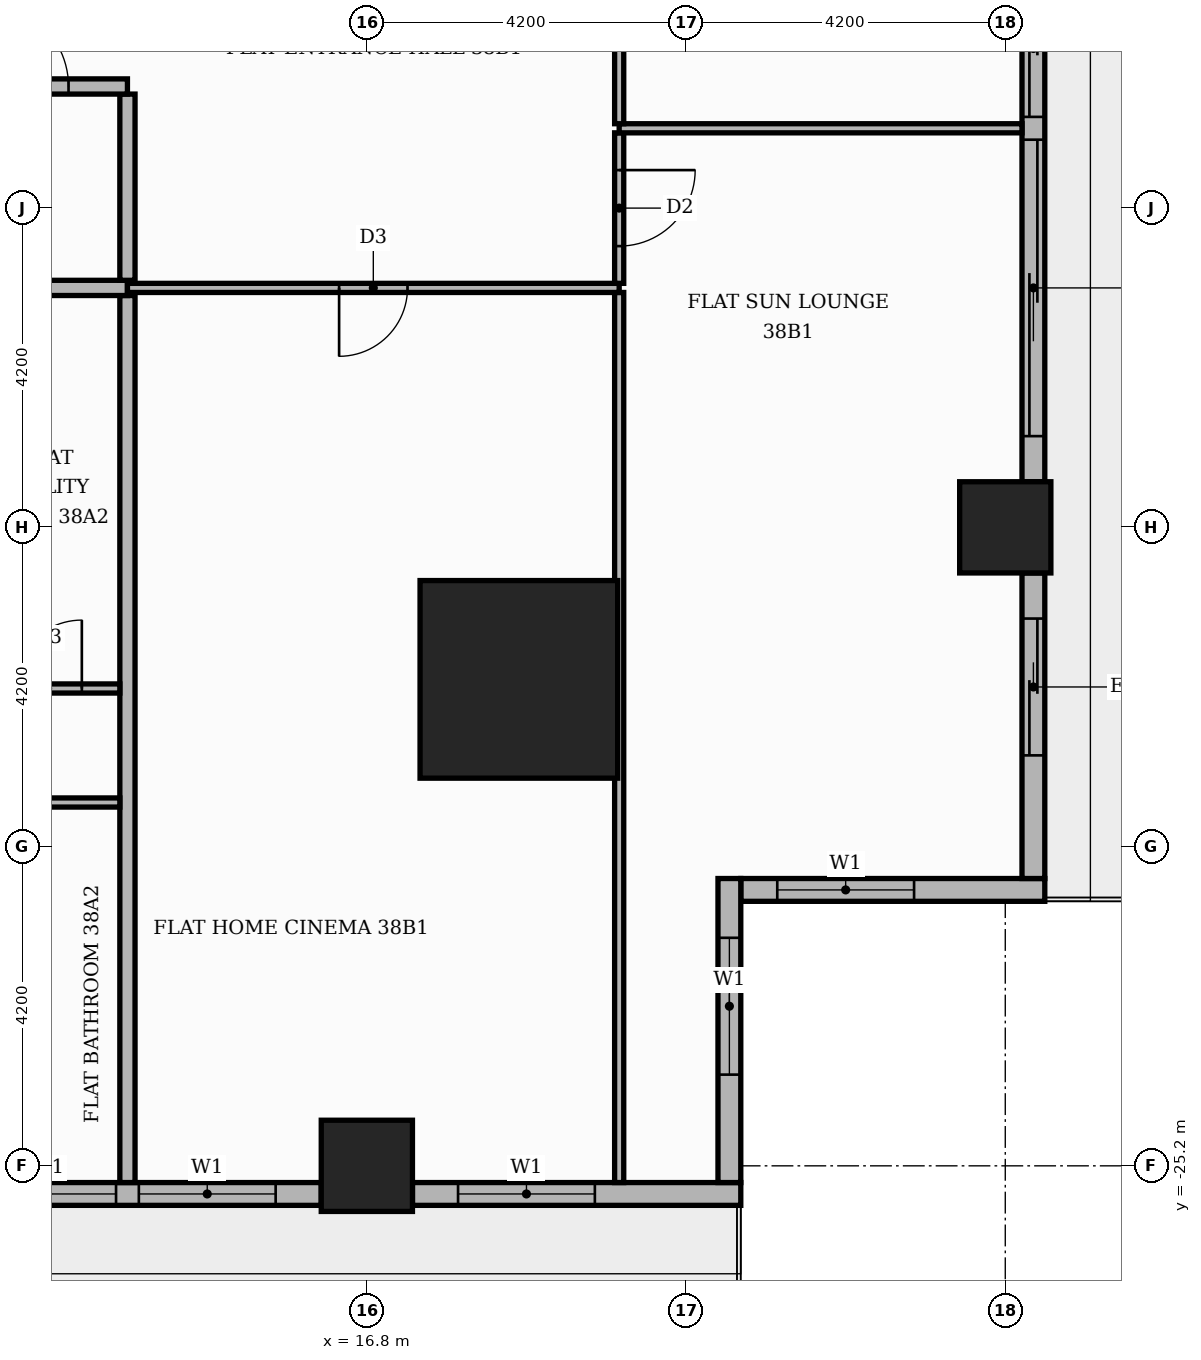
"""IFC4 building model, lengths in metres.
Left out: names, types, materials, properties, quantities, classifications, styles, units other than length and angle.
Written with IfcOpenShell. Run it as: python <this file> out.ifc"""

import sys

from ifc_helpers import new_model, si_unit, direction, frame, frame_2d, origin, origin_2d, place, context, subcontext, project, spatial, rectangle, extrude, element, fill, save


model = new_model("IFC4")
c1 = context("Model", 3, precision=1e-05, world=origin(), true_north=direction((0.0, 1.0)))
c2 = subcontext(c1, "Body", "Model", "MODEL_VIEW")
j1 = project(units=[si_unit("LENGTHUNIT", "METRE"), si_unit("PLANEANGLEUNIT", "RADIAN")], contexts=[c1])
p1 = place(None, origin())
s1 = spatial("IfcSite", under=j1, at=p1, CompositionType="ELEMENT")
p2 = place(p1, origin())
s2 = spatial("IfcBuilding", under=s1, at=p2, CompositionType="ELEMENT")
p3 = place(p2, frame((0.0, 0.0, 161.1)))
s3 = spatial("IfcBuildingStorey", under=s2, at=p3, CompositionType="ELEMENT", Elevation=161.1)
p4 = place(p3, frame((18.8, -18.8, 0.0), z_axis=(0.0, 0.0, 1.0), x_axis=(1.0, 0.0, 0.0)))
e1 = element("IfcColumn", 1, at=p4, inside=s3, PredefinedType="COLUMN", context=c2, shape_type="SweptSolid", body=[
    extrude(rectangle(XDim=2.6, YDim=2.6, at=origin_2d()), origin(), (0.0, 0.0, 1.0), 3.9),
])
for number, where, z_axis, x_axis in (
    (2, (25.2, -16.8, 0.0), (0.0, 0.0, 1.0), (1.0, 0.0, 0.0)),
    (3, (16.8, -25.2, 0.0), (0.0, 0.0, 1.0), (1.0, 0.0, 0.0)),
):
    element("IfcColumn", number, at=place(p3, frame(where, z_axis=z_axis, x_axis=x_axis)), inside=s3, PredefinedType="COLUMN", context=c2, shape_type="SweptSolid", body=[
        extrude(rectangle(XDim=1.2, YDim=1.2, at=origin_2d()), origin(), (0.0, 0.0, 1.0), 3.9),
    ])
p5 = place(p3, frame((21.72, -21.57, 0.0), z_axis=(0.0, 0.0, 1.0), x_axis=(1.0, 0.0, 0.0)))
e4 = element("IfcWall", 4, at=p5, inside=s3, PredefinedType="STANDARD", context=c2, shape_type="SweptSolid", body=[
    extrude(rectangle(XDim=4.0, YDim=0.3, at=frame_2d((2.0, 0.0))), origin(), (0.0, 0.0, 1.0), 3.48),
])
p6 = place(p5, frame((0.48, 0.0, 0.9)))
e5 = element("IfcOpeningElement", 5, at=p6, cuts=e4, PredefinedType="OPENING", context=c2, shape_type="SweptSolid", body=[
    extrude(rectangle(XDim=1.8, YDim=2.1, at=frame_2d((0.9, 1.05))), frame((0.0, 0.16, 0.0), z_axis=(0.0, -1.0, 0.0), x_axis=(1.0, 0.0, 0.0)), (0.0, 0.0, 1.0), 0.32),
])
p7 = place(p3, frame((25.57, -21.42, 0.0), z_axis=(0.0, 0.0, 1.0), x_axis=(0.0, 1.0, 0.0)))
e6 = element("IfcWall", 6, at=p7, inside=s3, PredefinedType="STANDARD", context=c2, shape_type="SweptSolid", body=[
    extrude(rectangle(XDim=4.02, YDim=0.3, at=frame_2d((2.01, 0.0))), origin(), (0.0, 0.0, 1.0), 3.48),
])
p8 = place(p7, frame((1.62, 0.0, 0.0)))
e7 = element("IfcOpeningElement", 7, at=p8, cuts=e6, PredefinedType="OPENING", context=c2, shape_type="SweptSolid", body=[
    extrude(rectangle(XDim=1.8, YDim=2.4, at=frame_2d((0.9, 1.2))), frame((0.0, 0.16, 0.0), z_axis=(0.0, -1.0, 0.0), x_axis=(1.0, 0.0, 0.0)), (0.0, 0.0, 1.0), 0.32),
])
p9 = place(p3, frame((25.57, -16.2, 0.0), z_axis=(0.0, 0.0, 1.0), x_axis=(0.0, 1.0, 0.0)))
e8 = element("IfcWall", 8, at=p9, inside=s3, PredefinedType="STANDARD", context=c2, shape_type="SweptSolid", body=[
    extrude(rectangle(XDim=7.2, YDim=0.3, at=frame_2d((3.6, 0.0))), origin(), (0.0, 0.0, 1.0), 3.48),
])
p10 = place(p9, frame((0.6, 0.0, 0.0)))
e9 = element("IfcOpeningElement", 9, at=p10, cuts=e8, PredefinedType="OPENING", context=c2, shape_type="SweptSolid", body=[
    extrude(rectangle(XDim=3.9, YDim=2.4, at=frame_2d((1.95, 1.2))), frame((0.0, 0.16, 0.0), z_axis=(0.0, -1.0, 0.0), x_axis=(1.0, 0.0, 0.0)), (0.0, 0.0, 1.0), 0.32),
])
p11 = place(p9, frame((4.8, 0.0, 0.0)))
e10 = element("IfcOpeningElement", 10, at=p11, cuts=e8, PredefinedType="OPENING", context=c2, shape_type="SweptSolid", body=[
    extrude(rectangle(XDim=1.8, YDim=2.4, at=frame_2d((0.9, 1.2))), frame((0.0, 0.16, 0.0), z_axis=(0.0, -1.0, 0.0), x_axis=(1.0, 0.0, 0.0)), (0.0, 0.0, 1.0), 0.32),
])
p12 = place(p3, frame((9.0, -25.57, 0.0), z_axis=(0.0, 0.0, 1.0), x_axis=(1.0, 0.0, 0.0)))
e11 = element("IfcWall", 11, at=p12, inside=s3, PredefinedType="STANDARD", context=c2, shape_type="SweptSolid", body=[
    extrude(rectangle(XDim=7.2, YDim=0.3, at=frame_2d((3.6, 0.0))), origin(), (0.0, 0.0, 1.0), 3.48),
])
p13 = place(p12, frame((0.6, 0.0, 0.9)))
e12 = element("IfcOpeningElement", 12, at=p13, cuts=e11, PredefinedType="OPENING", context=c2, shape_type="SweptSolid", body=[
    extrude(rectangle(XDim=1.8, YDim=2.1, at=frame_2d((0.9, 1.05))), frame((0.0, 0.16, 0.0), z_axis=(0.0, -1.0, 0.0), x_axis=(1.0, 0.0, 0.0)), (0.0, 0.0, 1.0), 0.32),
])
p14 = place(p12, frame((2.7, 0.0, 0.9)))
e13 = element("IfcOpeningElement", 13, at=p14, cuts=e11, PredefinedType="OPENING", context=c2, shape_type="SweptSolid", body=[
    extrude(rectangle(XDim=1.8, YDim=2.1, at=frame_2d((0.9, 1.05))), frame((0.0, 0.16, 0.0), z_axis=(0.0, -1.0, 0.0), x_axis=(1.0, 0.0, 0.0)), (0.0, 0.0, 1.0), 0.32),
])
p15 = place(p12, frame((4.8, 0.0, 0.9)))
e14 = element("IfcOpeningElement", 14, at=p15, cuts=e11, PredefinedType="OPENING", context=c2, shape_type="SweptSolid", body=[
    extrude(rectangle(XDim=1.8, YDim=2.1, at=frame_2d((0.9, 1.05))), frame((0.0, 0.16, 0.0), z_axis=(0.0, -1.0, 0.0), x_axis=(1.0, 0.0, 0.0)), (0.0, 0.0, 1.0), 0.32),
])
p16 = place(p3, frame((17.4, -25.57, 0.0), z_axis=(0.0, 0.0, 1.0), x_axis=(1.0, 0.0, 0.0)))
e15 = element("IfcWall", 15, at=p16, inside=s3, PredefinedType="STANDARD", context=c2, shape_type="SweptSolid", body=[
    extrude(rectangle(XDim=4.32, YDim=0.3, at=frame_2d((2.16, 0.0))), origin(), (0.0, 0.0, 1.0), 3.48),
])
p17 = place(p16, frame((0.6, 0.0, 0.9)))
e16 = element("IfcOpeningElement", 16, at=p17, cuts=e15, PredefinedType="OPENING", context=c2, shape_type="SweptSolid", body=[
    extrude(rectangle(XDim=1.8, YDim=2.1, at=frame_2d((0.9, 1.05))), frame((0.0, 0.16, 0.0), z_axis=(0.0, -1.0, 0.0), x_axis=(1.0, 0.0, 0.0)), (0.0, 0.0, 1.0), 0.32),
])
p18 = place(p3, frame((21.57, -25.42, 0.0), z_axis=(0.0, 0.0, 1.0), x_axis=(0.0, 1.0, 0.0)))
e17 = element("IfcWall", 17, at=p18, inside=s3, PredefinedType="STANDARD", context=c2, shape_type="SweptSolid", body=[
    extrude(rectangle(XDim=4.0, YDim=0.3, at=frame_2d((2.0, 0.0))), origin(), (0.0, 0.0, 1.0), 3.48),
])
p19 = place(p18, frame((1.42, 0.0, 0.9)))
e18 = element("IfcOpeningElement", 18, at=p19, cuts=e17, PredefinedType="OPENING", context=c2, shape_type="SweptSolid", body=[
    extrude(rectangle(XDim=1.8, YDim=2.1, at=frame_2d((0.9, 1.05))), frame((0.0, 0.16, 0.0), z_axis=(0.0, -1.0, 0.0), x_axis=(1.0, 0.0, 0.0)), (0.0, 0.0, 1.0), 0.32),
])
p20 = place(p3, frame((13.65, -25.42, 0.0), z_axis=(0.0, 0.0, 1.0), x_axis=(0.0, 1.0, 0.0)))
e19 = element("IfcWall", 19, at=p20, inside=s3, PredefinedType="PARTITIONING", context=c2, shape_type="SweptSolid", body=[
    extrude(rectangle(XDim=11.67, YDim=0.2, at=frame_2d((5.835, 0.0))), origin(), (0.0, 0.0, 1.0), 3.48),
])
p21 = place(p3, frame((20.12, -25.42, 0.0), z_axis=(0.0, 0.0, 1.0), x_axis=(0.0, 1.0, 0.0)))
e20 = element("IfcWall", 20, at=p21, inside=s3, PredefinedType="PARTITIONING", context=c2, shape_type="SweptSolid", body=[
    extrude(rectangle(XDim=11.71, YDim=0.12, at=frame_2d((5.855, 0.0))), origin(), (0.0, 0.0, 1.0), 3.48),
])
p22 = place(p3, frame((-5.15, -20.42, 0.0), z_axis=(0.0, 0.0, 1.0), x_axis=(1.0, 0.0, 0.0)))
e21 = element("IfcWall", 21, at=p22, inside=s3, PredefinedType="PARTITIONING", context=c2, shape_type="SweptSolid", body=[
    extrude(rectangle(XDim=18.7, YDim=0.12, at=frame_2d((9.35, 0.0))), origin(), (0.0, 0.0, 1.0), 3.48),
])
p23 = place(p22, frame((1.5, 0.0, 0.0)))
e22 = element("IfcOpeningElement", 22, at=p23, cuts=e21, PredefinedType="OPENING", context=c2, shape_type="SweptSolid", body=[
    extrude(rectangle(XDim=1.0, YDim=2.1, at=frame_2d((0.5, 1.05))), frame((0.0, 0.07, 0.0), z_axis=(0.0, -1.0, 0.0), x_axis=(1.0, 0.0, 0.0)), (0.0, 0.0, 1.0), 0.14),
])
p24 = place(p22, frame((5.75, 0.0, 0.0)))
e23 = element("IfcOpeningElement", 23, at=p24, cuts=e21, PredefinedType="OPENING", context=c2, shape_type="SweptSolid", body=[
    extrude(rectangle(XDim=0.9, YDim=2.1, at=frame_2d((0.45, 1.05))), frame((0.0, 0.07, 0.0), z_axis=(0.0, -1.0, 0.0), x_axis=(1.0, 0.0, 0.0)), (0.0, 0.0, 1.0), 0.14),
])
p25 = place(p22, frame((14.15, 0.0, 0.0)))
e24 = element("IfcOpeningElement", 24, at=p25, cuts=e21, PredefinedType="OPENING", context=c2, shape_type="SweptSolid", body=[
    extrude(rectangle(XDim=0.9, YDim=2.1, at=frame_2d((0.45, 1.05))), frame((0.0, 0.07, 0.0), z_axis=(0.0, -1.0, 0.0), x_axis=(1.0, 0.0, 0.0)), (0.0, 0.0, 1.0), 0.14),
])
p26 = place(p3, frame((-1.05, -18.92, 0.0), z_axis=(0.0, 0.0, 1.0), x_axis=(1.0, 0.0, 0.0)))
e25 = element("IfcWall", 25, at=p26, inside=s3, PredefinedType="PARTITIONING", context=c2, shape_type="SweptSolid", body=[
    extrude(rectangle(XDim=14.6, YDim=0.12, at=frame_2d((7.3, 0.0))), origin(), (0.0, 0.0, 1.0), 3.48),
])
p27 = place(p26, frame((2.7, 0.0, 0.0)))
e26 = element("IfcOpeningElement", 26, at=p27, cuts=e25, PredefinedType="OPENING", context=c2, shape_type="SweptSolid", body=[
    extrude(rectangle(XDim=0.9, YDim=2.1, at=frame_2d((0.45, 1.05))), frame((0.0, 0.07, 0.0), z_axis=(0.0, -1.0, 0.0), x_axis=(1.0, 0.0, 0.0)), (0.0, 0.0, 1.0), 0.14),
])
p28 = place(p26, frame((7.05, 0.0, 0.0)))
e27 = element("IfcOpeningElement", 27, at=p28, cuts=e25, PredefinedType="OPENING", context=c2, shape_type="SweptSolid", body=[
    extrude(rectangle(XDim=0.9, YDim=2.1, at=frame_2d((0.45, 1.05))), frame((0.0, 0.07, 0.0), z_axis=(0.0, -1.0, 0.0), x_axis=(1.0, 0.0, 0.0)), (0.0, 0.0, 1.0), 0.14),
])
p29 = place(p26, frame((10.2, 0.0, 0.0)))
e28 = element("IfcOpeningElement", 28, at=p29, cuts=e25, PredefinedType="OPENING", context=c2, shape_type="SweptSolid", body=[
    extrude(rectangle(XDim=0.9, YDim=2.1, at=frame_2d((0.45, 1.05))), frame((0.0, 0.07, 0.0), z_axis=(0.0, -1.0, 0.0), x_axis=(1.0, 0.0, 0.0)), (0.0, 0.0, 1.0), 0.14),
])
p30 = place(p26, frame((13.2, 0.0, 0.0)))
e29 = element("IfcOpeningElement", 29, at=p30, cuts=e25, PredefinedType="OPENING", context=c2, shape_type="SweptSolid", body=[
    extrude(rectangle(XDim=0.9, YDim=2.1, at=frame_2d((0.45, 1.05))), frame((0.0, 0.07, 0.0), z_axis=(0.0, -1.0, 0.0), x_axis=(1.0, 0.0, 0.0)), (0.0, 0.0, 1.0), 0.14),
])
p31 = place(p3, frame((-25.42, -13.65, 0.0), z_axis=(0.0, 0.0, 1.0), x_axis=(1.0, 0.0, 0.0)))
e30 = element("IfcWall", 30, at=p31, inside=s3, PredefinedType="PARTITIONING", context=c2, shape_type="SweptSolid", body=[
    extrude(rectangle(XDim=39.07, YDim=0.2, at=frame_2d((19.535, 0.0))), origin(), (0.0, 0.0, 1.0), 3.48),
])
p32 = place(p31, frame((13.32, 0.0, 0.0)))
e31 = element("IfcOpeningElement", 31, at=p32, cuts=e30, PredefinedType="OPENING", context=c2, shape_type="SweptSolid", body=[
    extrude(rectangle(XDim=1.1, YDim=2.4, at=frame_2d((0.55, 1.2))), frame((0.0, 0.11, 0.0), z_axis=(0.0, -1.0, 0.0), x_axis=(1.0, 0.0, 0.0)), (0.0, 0.0, 1.0), 0.22),
])
p33 = place(p31, frame((21.72, 0.0, 0.0)))
e32 = element("IfcOpeningElement", 32, at=p33, cuts=e30, PredefinedType="OPENING", context=c2, shape_type="SweptSolid", body=[
    extrude(rectangle(XDim=1.1, YDim=2.4, at=frame_2d((0.55, 1.2))), frame((0.0, 0.11, 0.0), z_axis=(0.0, -1.0, 0.0), x_axis=(1.0, 0.0, 0.0)), (0.0, 0.0, 1.0), 0.22),
])
p34 = place(p3, frame((13.65, -13.65, 0.0), z_axis=(0.0, 0.0, 1.0), x_axis=(1.0, 0.0, 0.0)))
e33 = element("IfcWall", 33, at=p34, inside=s3, PredefinedType="PARTITIONING", context=c2, shape_type="SweptSolid", body=[
    extrude(rectangle(XDim=6.47, YDim=0.12, at=frame_2d((3.235, 0.0))), origin(), (0.0, 0.0, 1.0), 3.48),
])
p35 = place(p34, frame((2.785, 0.0, 0.0)))
e34 = element("IfcOpeningElement", 34, at=p35, cuts=e33, PredefinedType="OPENING", context=c2, shape_type="SweptSolid", body=[
    extrude(rectangle(XDim=0.9, YDim=2.1, at=frame_2d((0.45, 1.05))), frame((0.0, 0.07, 0.0), z_axis=(0.0, -1.0, 0.0), x_axis=(1.0, 0.0, 0.0)), (0.0, 0.0, 1.0), 0.14),
])
p36 = place(p3, frame((20.12, -13.59, 0.0), z_axis=(0.0, 0.0, 1.0), x_axis=(0.0, 1.0, 0.0)))
e35 = element("IfcWall", 35, at=p36, inside=s3, PredefinedType="PARTITIONING", context=c2, shape_type="SweptSolid", body=[
    extrude(rectangle(XDim=1.98, YDim=0.12, at=frame_2d((0.99, 0.0))), origin(), (0.0, 0.0, 1.0), 3.48),
])
p37 = place(p36, frame((0.49, 0.0, 0.0)))
e36 = element("IfcOpeningElement", 36, at=p37, cuts=e35, PredefinedType="OPENING", context=c2, shape_type="SweptSolid", body=[
    extrude(rectangle(XDim=1.0, YDim=2.1, at=frame_2d((0.5, 1.05))), frame((0.0, 0.07, 0.0), z_axis=(0.0, -1.0, 0.0), x_axis=(1.0, 0.0, 0.0)), (0.0, 0.0, 1.0), 0.14),
])
p38 = place(p3, frame((13.65, -13.55, 0.0), z_axis=(0.0, 0.0, 1.0), x_axis=(0.0, 1.0, 0.0)))
e37 = element("IfcWall", 37, at=p38, inside=s3, PredefinedType="PARTITIONING", context=c2, shape_type="SweptSolid", body=[
    extrude(rectangle(XDim=2.45, YDim=0.2, at=frame_2d((1.225, 0.0))), origin(), (0.0, 0.0, 1.0), 3.48),
])
p39 = place(p3, frame((20.12, -11.55, 0.0), z_axis=(0.0, 0.0, 1.0), x_axis=(1.0, 0.0, 0.0)))
e38 = element("IfcWall", 38, at=p39, inside=s3, PredefinedType="PARTITIONING", context=c2, shape_type="SweptSolid", body=[
    extrude(rectangle(XDim=5.3, YDim=0.12, at=frame_2d((2.65, 0.0))), origin(), (0.0, 0.0, 1.0), 3.48),
])
p40 = place(p3, frame((20.12, -11.49, 0.0), z_axis=(0.0, 0.0, 1.0), x_axis=(0.0, 1.0, 0.0)))
e39 = element("IfcWall", 39, at=p40, inside=s3, PredefinedType="PARTITIONING", context=c2, shape_type="SweptSolid", body=[
    extrude(rectangle(XDim=8.28, YDim=0.12, at=frame_2d((4.14, 0.0))), origin(), (0.0, 0.0, 1.0), 3.48),
])
p41 = place(p40, frame((3.64, 0.0, 0.0)))
e40 = element("IfcOpeningElement", 40, at=p41, cuts=e39, PredefinedType="OPENING", context=c2, shape_type="SweptSolid", body=[
    extrude(rectangle(XDim=1.0, YDim=2.1, at=frame_2d((0.5, 1.05))), frame((0.0, 0.07, 0.0), z_axis=(0.0, -1.0, 0.0), x_axis=(1.0, 0.0, 0.0)), (0.0, 0.0, 1.0), 0.14),
])
p42 = place(p3, frame((11.0, -11.0, 0.0), z_axis=(0.0, 0.0, 1.0), x_axis=(1.0, 0.0, 0.0)))
e41 = element("IfcWall", 41, at=p42, inside=s3, PredefinedType="PARTITIONING", context=c2, shape_type="SweptSolid", body=[
    extrude(rectangle(XDim=2.65, YDim=0.2, at=frame_2d((1.325, 0.0))), origin(), (0.0, 0.0, 1.0), 3.48),
])
p43 = place(p42, frame((0.775, 0.0, 0.0)))
e42 = element("IfcOpeningElement", 42, at=p43, cuts=e41, PredefinedType="OPENING", context=c2, shape_type="SweptSolid", body=[
    extrude(rectangle(XDim=1.1, YDim=2.4, at=frame_2d((0.55, 1.2))), frame((0.0, 0.11, 0.0), z_axis=(0.0, -1.0, 0.0), x_axis=(1.0, 0.0, 0.0)), (0.0, 0.0, 1.0), 0.22),
])
p44 = place(p6, origin())
e43 = element("IfcWindow", 43, at=p44, inside=s3, PartitioningType="SINGLE_PANEL", PredefinedType="WINDOW", context=c2, shape_type="SweptSolid", body=[
    extrude(rectangle(XDim=1.8, YDim=2.1, at=frame_2d((0.9, 1.05))), frame((0.0, 0.03, 0.0), z_axis=(0.0, -1.0, 0.0), x_axis=(1.0, 0.0, 0.0)), (0.0, 0.0, 1.0), 0.06),
])
fill(e5, e43)
p45 = place(p8, origin())
e44 = element("IfcDoor", 44, at=p45, inside=s3, OperationType="SLIDING_TO_RIGHT", PredefinedType="DOOR", context=c2, shape_type="SweptSolid", body=[
    extrude(rectangle(XDim=1.8, YDim=2.4, at=frame_2d((0.9, 1.2))), frame((0.0, 0.025, 0.0), z_axis=(0.0, -1.0, 0.0), x_axis=(1.0, 0.0, 0.0)), (0.0, 0.0, 1.0), 0.05),
])
fill(e7, e44)
p46 = place(p10, origin())
e45 = element("IfcDoor", 45, at=p46, inside=s3, OperationType="SLIDING_TO_LEFT", PredefinedType="DOOR", context=c2, shape_type="SweptSolid", body=[
    extrude(rectangle(XDim=3.9, YDim=2.4, at=frame_2d((1.95, 1.2))), frame((0.0, 0.025, 0.0), z_axis=(0.0, -1.0, 0.0), x_axis=(1.0, 0.0, 0.0)), (0.0, 0.0, 1.0), 0.05),
])
fill(e9, e45)
p47 = place(p11, origin())
e46 = element("IfcDoor", 46, at=p47, inside=s3, OperationType="SLIDING_TO_RIGHT", PredefinedType="DOOR", context=c2, shape_type="SweptSolid", body=[
    extrude(rectangle(XDim=1.8, YDim=2.4, at=frame_2d((0.9, 1.2))), frame((0.0, 0.025, 0.0), z_axis=(0.0, -1.0, 0.0), x_axis=(1.0, 0.0, 0.0)), (0.0, 0.0, 1.0), 0.05),
])
fill(e10, e46)
p48 = place(p14, origin())
e47 = element("IfcWindow", 47, at=p48, inside=s3, PartitioningType="SINGLE_PANEL", PredefinedType="WINDOW", context=c2, shape_type="SweptSolid", body=[
    extrude(rectangle(XDim=1.8, YDim=2.1, at=frame_2d((0.9, 1.05))), frame((0.0, 0.03, 0.0), z_axis=(0.0, -1.0, 0.0), x_axis=(1.0, 0.0, 0.0)), (0.0, 0.0, 1.0), 0.06),
])
fill(e13, e47)
p49 = place(p15, origin())
e48 = element("IfcWindow", 48, at=p49, inside=s3, PartitioningType="SINGLE_PANEL", PredefinedType="WINDOW", context=c2, shape_type="SweptSolid", body=[
    extrude(rectangle(XDim=1.8, YDim=2.1, at=frame_2d((0.9, 1.05))), frame((0.0, 0.03, 0.0), z_axis=(0.0, -1.0, 0.0), x_axis=(1.0, 0.0, 0.0)), (0.0, 0.0, 1.0), 0.06),
])
fill(e14, e48)
p50 = place(p17, origin())
e49 = element("IfcWindow", 49, at=p50, inside=s3, PartitioningType="SINGLE_PANEL", PredefinedType="WINDOW", context=c2, shape_type="SweptSolid", body=[
    extrude(rectangle(XDim=1.8, YDim=2.1, at=frame_2d((0.9, 1.05))), frame((0.0, 0.03, 0.0), z_axis=(0.0, -1.0, 0.0), x_axis=(1.0, 0.0, 0.0)), (0.0, 0.0, 1.0), 0.06),
])
fill(e16, e49)
p51 = place(p19, origin())
e50 = element("IfcWindow", 50, at=p51, inside=s3, PartitioningType="SINGLE_PANEL", PredefinedType="WINDOW", context=c2, shape_type="SweptSolid", body=[
    extrude(rectangle(XDim=1.8, YDim=2.1, at=frame_2d((0.9, 1.05))), frame((0.0, 0.03, 0.0), z_axis=(0.0, -1.0, 0.0), x_axis=(1.0, 0.0, 0.0)), (0.0, 0.0, 1.0), 0.06),
])
fill(e18, e50)
p52 = place(p30, origin())
e51 = element("IfcDoor", 51, at=p52, inside=s3, OperationType="SINGLE_SWING_RIGHT", PredefinedType="DOOR", context=c2, shape_type="SweptSolid", body=[
    extrude(rectangle(XDim=0.9, YDim=2.1, at=frame_2d((0.45, 1.05))), frame((0.0, 0.025, 0.0), z_axis=(0.0, -1.0, 0.0), x_axis=(1.0, 0.0, 0.0)), (0.0, 0.0, 1.0), 0.05),
])
fill(e29, e51)
p53 = place(p43, origin())
e52 = element("IfcDoor", 52, at=p53, inside=s3, OperationType="SINGLE_SWING_LEFT", PredefinedType="DOOR", context=c2, shape_type="SweptSolid", body=[
    extrude(rectangle(XDim=1.1, YDim=2.4, at=frame_2d((0.55, 1.2))), frame((0.0, 0.025, 0.0), z_axis=(0.0, -1.0, 0.0), x_axis=(1.0, 0.0, 0.0)), (0.0, 0.0, 1.0), 0.05),
])
fill(e42, e52)
p54 = place(p35, frame((0.9, 0.0, 0.0), z_axis=(0.0, 0.0, 1.0), x_axis=(-1.0, 0.0, 0.0)))
e53 = element("IfcDoor", 53, at=p54, inside=s3, OperationType="SINGLE_SWING_LEFT", PredefinedType="DOOR", context=c2, shape_type="SweptSolid", body=[
    extrude(rectangle(XDim=0.9, YDim=2.1, at=frame_2d((0.45, 1.05))), frame((0.0, 0.025, 0.0), z_axis=(0.0, -1.0, 0.0), x_axis=(1.0, 0.0, 0.0)), (0.0, 0.0, 1.0), 0.05),
])
fill(e34, e53)
p55 = place(p37, frame((1.0, 0.0, 0.0), z_axis=(0.0, 0.0, 1.0), x_axis=(-1.0, 0.0, 0.0)))
e54 = element("IfcDoor", 54, at=p55, inside=s3, OperationType="SINGLE_SWING_RIGHT", PredefinedType="DOOR", context=c2, shape_type="SweptSolid", body=[
    extrude(rectangle(XDim=1.0, YDim=2.1, at=frame_2d((0.5, 1.05))), frame((0.0, 0.025, 0.0), z_axis=(0.0, -1.0, 0.0), x_axis=(1.0, 0.0, 0.0)), (0.0, 0.0, 1.0), 0.05),
])
fill(e36, e54)
save(model, sys.argv[1])
